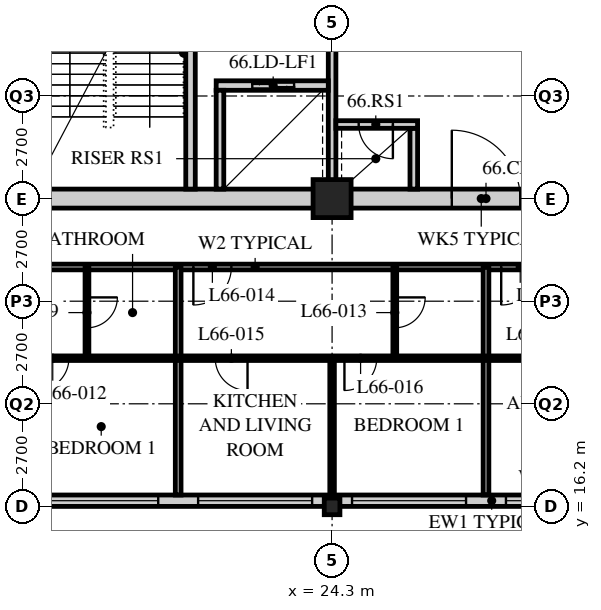
"""IFC4 building model, lengths in metres.
Left out: names, types, materials, properties, quantities, classifications, styles, units other than length and angle.
Written with IfcOpenShell. Run it as: python <this file> out.ifc"""

import sys

from ifc_helpers import new_model, si_unit, direction, frame, frame_2d, origin, origin_2d, place, context, subcontext, project, spatial, rectangle, hollow_rectangle, i_section, extrude, element, fill, save


model = new_model("IFC4")
c1 = context("Model", 3, precision=1e-05, world=origin(), true_north=direction((0.0, 1.0)))
c2 = subcontext(c1, "Body", "Model", "MODEL_VIEW")
j1 = project(units=[si_unit("LENGTHUNIT", "METRE"), si_unit("PLANEANGLEUNIT", "RADIAN")], contexts=[c1])
p1 = place(None, origin())
s1 = spatial("IfcSite", under=j1, at=p1, CompositionType="ELEMENT")
p2 = place(p1, origin())
s2 = spatial("IfcBuilding", under=s1, at=p2, CompositionType="ELEMENT")
p3 = place(p2, frame((0.0, 0.0, 258.0)))
s3 = spatial("IfcBuildingStorey", under=s2, at=p3, CompositionType="ELEMENT", Elevation=258.0)
p4 = place(p3, frame((24.3, 16.2, 0.0), z_axis=(0.0, 0.0, 1.0), x_axis=(1.0, 0.0, 0.0)))
e1 = element("IfcColumn", 1, at=p4, inside=s3, PredefinedType="COLUMN", context=c2, shape_type="SweptSolid", body=[
    extrude(i_section(OverallWidth=0.412, OverallDepth=0.437, WebThickness=0.036, FlangeThickness=0.058, FilletRadius=0.015, at=origin_2d()), origin(), (0.0, 0.0, 1.0), 3.9),
])
p5 = place(p3, frame((24.3, 24.3, 0.0), z_axis=(0.0, 0.0, 1.0), x_axis=(1.0, 0.0, 0.0)))
e2 = element("IfcColumn", 2, at=p5, inside=s3, PredefinedType="COLUMN", context=c2, shape_type="SweptSolid", body=[
    extrude(hollow_rectangle(XDim=1.0, YDim=1.0, WallThickness=0.1, at=origin_2d()), origin(), (0.0, 0.0, 1.0), 3.9),
])
p6 = place(p3, frame((8.4, 16.35, 0.0), z_axis=(0.0, 0.0, 1.0), x_axis=(1.0, 0.0, 0.0)))
e3 = element("IfcWall", 3, at=p6, inside=s3, PredefinedType="SOLIDWALL", context=c2, shape_type="SweptSolid", body=[
    extrude(rectangle(XDim=40.2, YDim=0.3, at=frame_2d((20.1, 0.0))), origin(), (0.0, 0.0, 1.0), 3.69),
])
p7 = place(p6, frame((0.225, 0.0, 0.6)))
e4 = element("IfcOpeningElement", 4, at=p7, cuts=e3, PredefinedType="OPENING", context=c2, shape_type="SweptSolid", body=[
    extrude(rectangle(XDim=3.0, YDim=2.4, at=frame_2d((1.5, 1.2))), frame((0.0, 0.16, 0.0), z_axis=(0.0, -1.0, 0.0), x_axis=(1.0, 0.0, 0.0)), (0.0, 0.0, 1.0), 0.32),
])
p8 = place(p6, frame((4.275, 0.0, 0.6)))
e5 = element("IfcOpeningElement", 5, at=p8, cuts=e3, PredefinedType="OPENING", context=c2, shape_type="SweptSolid", body=[
    extrude(rectangle(XDim=3.0, YDim=2.4, at=frame_2d((1.5, 1.2))), frame((0.0, 0.16, 0.0), z_axis=(0.0, -1.0, 0.0), x_axis=(1.0, 0.0, 0.0)), (0.0, 0.0, 1.0), 0.32),
])
p9 = place(p6, frame((8.325, 0.0, 0.6)))
e6 = element("IfcOpeningElement", 6, at=p9, cuts=e3, PredefinedType="OPENING", context=c2, shape_type="SweptSolid", body=[
    extrude(rectangle(XDim=3.0, YDim=2.4, at=frame_2d((1.5, 1.2))), frame((0.0, 0.16, 0.0), z_axis=(0.0, -1.0, 0.0), x_axis=(1.0, 0.0, 0.0)), (0.0, 0.0, 1.0), 0.32),
])
p10 = place(p6, frame((12.375, 0.0, 0.6)))
e7 = element("IfcOpeningElement", 7, at=p10, cuts=e3, PredefinedType="OPENING", context=c2, shape_type="SweptSolid", body=[
    extrude(rectangle(XDim=3.0, YDim=2.4, at=frame_2d((1.5, 1.2))), frame((0.0, 0.16, 0.0), z_axis=(0.0, -1.0, 0.0), x_axis=(1.0, 0.0, 0.0)), (0.0, 0.0, 1.0), 0.32),
])
p11 = place(p6, frame((16.425, 0.0, 0.6)))
e8 = element("IfcOpeningElement", 8, at=p11, cuts=e3, PredefinedType="OPENING", context=c2, shape_type="SweptSolid", body=[
    extrude(rectangle(XDim=3.0, YDim=2.4, at=frame_2d((1.5, 1.2))), frame((0.0, 0.16, 0.0), z_axis=(0.0, -1.0, 0.0), x_axis=(1.0, 0.0, 0.0)), (0.0, 0.0, 1.0), 0.32),
])
p12 = place(p6, frame((20.475, 0.0, 0.6)))
e9 = element("IfcOpeningElement", 9, at=p12, cuts=e3, PredefinedType="OPENING", context=c2, shape_type="SweptSolid", body=[
    extrude(rectangle(XDim=3.0, YDim=2.4, at=frame_2d((1.5, 1.2))), frame((0.0, 0.16, 0.0), z_axis=(0.0, -1.0, 0.0), x_axis=(1.0, 0.0, 0.0)), (0.0, 0.0, 1.0), 0.32),
])
p13 = place(p6, frame((24.525, 0.0, 0.6)))
e10 = element("IfcOpeningElement", 10, at=p13, cuts=e3, PredefinedType="OPENING", context=c2, shape_type="SweptSolid", body=[
    extrude(rectangle(XDim=3.0, YDim=2.4, at=frame_2d((1.5, 1.2))), frame((0.0, 0.16, 0.0), z_axis=(0.0, -1.0, 0.0), x_axis=(1.0, 0.0, 0.0)), (0.0, 0.0, 1.0), 0.32),
])
p14 = place(p6, frame((28.575, 0.0, 0.6)))
e11 = element("IfcOpeningElement", 11, at=p14, cuts=e3, PredefinedType="OPENING", context=c2, shape_type="SweptSolid", body=[
    extrude(rectangle(XDim=3.0, YDim=2.4, at=frame_2d((1.5, 1.2))), frame((0.0, 0.16, 0.0), z_axis=(0.0, -1.0, 0.0), x_axis=(1.0, 0.0, 0.0)), (0.0, 0.0, 1.0), 0.32),
])
p15 = place(p6, frame((32.625, 0.0, 0.6)))
e12 = element("IfcOpeningElement", 12, at=p15, cuts=e3, PredefinedType="OPENING", context=c2, shape_type="SweptSolid", body=[
    extrude(rectangle(XDim=3.0, YDim=2.4, at=frame_2d((1.5, 1.2))), frame((0.0, 0.16, 0.0), z_axis=(0.0, -1.0, 0.0), x_axis=(1.0, 0.0, 0.0)), (0.0, 0.0, 1.0), 0.32),
])
p16 = place(p6, frame((36.675, 0.0, 0.6)))
e13 = element("IfcOpeningElement", 13, at=p16, cuts=e3, PredefinedType="OPENING", context=c2, shape_type="SweptSolid", body=[
    extrude(rectangle(XDim=3.0, YDim=2.4, at=frame_2d((1.5, 1.2))), frame((0.0, 0.16, 0.0), z_axis=(0.0, -1.0, 0.0), x_axis=(1.0, 0.0, 0.0)), (0.0, 0.0, 1.0), 0.32),
])
p17 = place(p3, frame((8.1, 22.5, 0.0), z_axis=(0.0, 0.0, 1.0), x_axis=(1.0, 0.0, 0.0)))
e14 = element("IfcWall", 14, at=p17, inside=s3, PredefinedType="PARTITIONING", context=c2, shape_type="SweptSolid", body=[
    extrude(rectangle(XDim=28.35, YDim=0.15, at=frame_2d((14.175, 0.0))), origin(), (0.0, 0.0, 1.0), 3.69),
])
p18 = place(p17, frame((4.45, 0.0, 0.0)))
e15 = element("IfcOpeningElement", 15, at=p18, cuts=e14, PredefinedType="OPENING", context=c2, shape_type="SweptSolid", body=[
    extrude(rectangle(XDim=1.0, YDim=2.1, at=frame_2d((0.5, 1.05))), frame((0.0, 0.085, 0.0), z_axis=(0.0, -1.0, 0.0), x_axis=(1.0, 0.0, 0.0)), (0.0, 0.0, 1.0), 0.17),
])
p19 = place(p17, frame((12.55, 0.0, 0.0)))
e16 = element("IfcOpeningElement", 16, at=p19, cuts=e14, PredefinedType="OPENING", context=c2, shape_type="SweptSolid", body=[
    extrude(rectangle(XDim=1.0, YDim=2.1, at=frame_2d((0.5, 1.05))), frame((0.0, 0.085, 0.0), z_axis=(0.0, -1.0, 0.0), x_axis=(1.0, 0.0, 0.0)), (0.0, 0.0, 1.0), 0.17),
])
p20 = place(p17, frame((20.65, 0.0, 0.0)))
e17 = element("IfcOpeningElement", 17, at=p20, cuts=e14, PredefinedType="OPENING", context=c2, shape_type="SweptSolid", body=[
    extrude(rectangle(XDim=1.0, YDim=2.1, at=frame_2d((0.5, 1.05))), frame((0.0, 0.085, 0.0), z_axis=(0.0, -1.0, 0.0), x_axis=(1.0, 0.0, 0.0)), (0.0, 0.0, 1.0), 0.17),
])
p21 = place(p17, frame((2.625, 0.0, 0.0)))
e18 = element("IfcOpeningElement", 18, at=p21, cuts=e14, PredefinedType="OPENING", context=c2, shape_type="SweptSolid", body=[
    extrude(rectangle(XDim=1.0, YDim=2.1, at=frame_2d((0.5, 1.05))), frame((0.0, 0.085, 0.0), z_axis=(0.0, -1.0, 0.0), x_axis=(1.0, 0.0, 0.0)), (0.0, 0.0, 1.0), 0.17),
])
p22 = place(p3, frame((17.85, 22.5, 0.0), z_axis=(0.0, 0.0, 1.0), x_axis=(0.0, -1.0, 0.0)))
e19 = element("IfcWall", 19, at=p22, inside=s3, PredefinedType="PARTITIONING", context=c2, shape_type="SweptSolid", body=[
    extrude(rectangle(XDim=2.4, YDim=0.1, at=frame_2d((1.2, 0.0))), origin(), (0.0, 0.0, 1.0), 3.69),
])
p23 = place(p22, frame((0.8, 0.0, 0.0)))
e20 = element("IfcOpeningElement", 20, at=p23, cuts=e19, PredefinedType="OPENING", context=c2, shape_type="SweptSolid", body=[
    extrude(rectangle(XDim=0.8, YDim=2.1, at=frame_2d((0.4, 1.05))), frame((0.0, 0.06, 0.0), z_axis=(0.0, -1.0, 0.0), x_axis=(1.0, 0.0, 0.0)), (0.0, 0.0, 1.0), 0.12),
])
p24 = place(p3, frame((20.25, 22.5, 0.0), z_axis=(0.0, 0.0, 1.0), x_axis=(0.0, -1.0, 0.0)))
e21 = element("IfcWall", 21, at=p24, inside=s3, PredefinedType="PARTITIONING", context=c2, shape_type="SweptSolid", body=[
    extrude(rectangle(XDim=6.0, YDim=0.15, at=frame_2d((3.0, 0.0))), origin(), (0.0, 0.0, 1.0), 3.69),
])
p25 = place(p3, frame((25.95, 22.5, 0.0), z_axis=(0.0, 0.0, 1.0), x_axis=(0.0, -1.0, 0.0)))
e22 = element("IfcWall", 22, at=p25, inside=s3, PredefinedType="PARTITIONING", context=c2, shape_type="SweptSolid", body=[
    extrude(rectangle(XDim=2.4, YDim=0.1, at=frame_2d((1.2, 0.0))), origin(), (0.0, 0.0, 1.0), 3.69),
])
p26 = place(p25, frame((0.8, 0.0, 0.0)))
e23 = element("IfcOpeningElement", 23, at=p26, cuts=e22, PredefinedType="OPENING", context=c2, shape_type="SweptSolid", body=[
    extrude(rectangle(XDim=0.8, YDim=2.1, at=frame_2d((0.4, 1.05))), frame((0.0, 0.06, 0.0), z_axis=(0.0, -1.0, 0.0), x_axis=(1.0, 0.0, 0.0)), (0.0, 0.0, 1.0), 0.12),
])
p27 = place(p3, frame((24.3, 20.1, 0.0), z_axis=(0.0, 0.0, 1.0), x_axis=(0.0, -1.0, 0.0)))
e24 = element("IfcWall", 24, at=p27, inside=s3, PredefinedType="PARTITIONING", context=c2, shape_type="SweptSolid", body=[
    extrude(rectangle(XDim=3.6, YDim=0.12, at=frame_2d((1.8, 0.0))), origin(), (0.0, 0.0, 1.0), 3.078),
])
p28 = place(p3, frame((28.35, 22.5, 0.0), z_axis=(0.0, 0.0, 1.0), x_axis=(0.0, -1.0, 0.0)))
e25 = element("IfcWall", 25, at=p28, inside=s3, PredefinedType="PARTITIONING", context=c2, shape_type="SweptSolid", body=[
    extrude(rectangle(XDim=6.0, YDim=0.15, at=frame_2d((3.0, 0.0))), origin(), (0.0, 0.0, 1.0), 3.69),
])
p29 = place(p3, frame((8.1, 20.1, 0.0), z_axis=(0.0, 0.0, 1.0), x_axis=(1.0, 0.0, 0.0)))
e26 = element("IfcWall", 26, at=p29, inside=s3, PredefinedType="PARTITIONING", context=c2, shape_type="SweptSolid", body=[
    extrude(rectangle(XDim=28.35, YDim=0.12, at=frame_2d((14.175, 0.0))), origin(), (0.0, 0.0, 1.0), 3.69),
])
p30 = place(p29, frame((5.025, 0.0, 0.0)))
e27 = element("IfcOpeningElement", 27, at=p30, cuts=e26, PredefinedType="OPENING", context=c2, shape_type="SweptSolid", body=[
    extrude(rectangle(XDim=0.85, YDim=2.1, at=frame_2d((0.425, 1.05))), frame((0.0, 0.07, 0.0), z_axis=(0.0, -1.0, 0.0), x_axis=(1.0, 0.0, 0.0)), (0.0, 0.0, 1.0), 0.14),
])
p31 = place(p29, frame((8.425, 0.0, 0.0)))
e28 = element("IfcOpeningElement", 28, at=p31, cuts=e26, PredefinedType="OPENING", context=c2, shape_type="SweptSolid", body=[
    extrude(rectangle(XDim=0.85, YDim=2.1, at=frame_2d((0.425, 1.05))), frame((0.0, 0.07, 0.0), z_axis=(0.0, -1.0, 0.0), x_axis=(1.0, 0.0, 0.0)), (0.0, 0.0, 1.0), 0.14),
])
p32 = place(p29, frame((13.125, 0.0, 0.0)))
e29 = element("IfcOpeningElement", 29, at=p32, cuts=e26, PredefinedType="OPENING", context=c2, shape_type="SweptSolid", body=[
    extrude(rectangle(XDim=0.85, YDim=2.1, at=frame_2d((0.425, 1.05))), frame((0.0, 0.07, 0.0), z_axis=(0.0, -1.0, 0.0), x_axis=(1.0, 0.0, 0.0)), (0.0, 0.0, 1.0), 0.14),
])
p33 = place(p29, frame((16.525, 0.0, 0.0)))
e30 = element("IfcOpeningElement", 30, at=p33, cuts=e26, PredefinedType="OPENING", context=c2, shape_type="SweptSolid", body=[
    extrude(rectangle(XDim=0.85, YDim=2.1, at=frame_2d((0.425, 1.05))), frame((0.0, 0.07, 0.0), z_axis=(0.0, -1.0, 0.0), x_axis=(1.0, 0.0, 0.0)), (0.0, 0.0, 1.0), 0.14),
])
p34 = place(p29, frame((21.225, 0.0, 0.0)))
e31 = element("IfcOpeningElement", 31, at=p34, cuts=e26, PredefinedType="OPENING", context=c2, shape_type="SweptSolid", body=[
    extrude(rectangle(XDim=0.85, YDim=2.1, at=frame_2d((0.425, 1.05))), frame((0.0, 0.07, 0.0), z_axis=(0.0, -1.0, 0.0), x_axis=(1.0, 0.0, 0.0)), (0.0, 0.0, 1.0), 0.14),
])
p35 = place(p29, frame((24.625, 0.0, 0.0)))
e32 = element("IfcOpeningElement", 32, at=p35, cuts=e26, PredefinedType="OPENING", context=c2, shape_type="SweptSolid", body=[
    extrude(rectangle(XDim=0.85, YDim=2.1, at=frame_2d((0.425, 1.05))), frame((0.0, 0.07, 0.0), z_axis=(0.0, -1.0, 0.0), x_axis=(1.0, 0.0, 0.0)), (0.0, 0.0, 1.0), 0.14),
])
p36 = place(p29, frame((2.725, 0.0, 0.0)))
e33 = element("IfcOpeningElement", 33, at=p36, cuts=e26, PredefinedType="OPENING", context=c2, shape_type="SweptSolid", body=[
    extrude(rectangle(XDim=0.85, YDim=2.1, at=frame_2d((0.425, 1.05))), frame((0.0, 0.07, 0.0), z_axis=(0.0, -1.0, 0.0), x_axis=(1.0, 0.0, 0.0)), (0.0, 0.0, 1.0), 0.14),
])
p37 = place(p3, frame((15.95, 24.3, 0.0), z_axis=(0.0, 0.0, 1.0), x_axis=(1.0, 0.0, 0.0)))
e34 = element("IfcWall", 34, at=p37, inside=s3, PredefinedType="SOLIDWALL", context=c2, shape_type="SweptSolid", body=[
    extrude(rectangle(XDim=24.55, YDim=0.5, at=frame_2d((12.275, 0.0))), origin(), (0.0, 0.0, 1.0), 3.04),
])
p38 = place(p37, frame((11.5, 0.0, 0.0)))
e35 = element("IfcOpeningElement", 35, at=p38, cuts=e34, PredefinedType="OPENING", context=c2, shape_type="SweptSolid", body=[
    extrude(rectangle(XDim=1.8, YDim=2.4, at=frame_2d((0.9, 1.2))), frame((0.0, 0.26, 0.0), z_axis=(0.0, -1.0, 0.0), x_axis=(1.0, 0.0, 0.0)), (0.0, 0.0, 1.0), 0.52),
])
p39 = place(p3, frame((24.3, 24.55, 0.0), z_axis=(0.0, 0.0, 1.0), x_axis=(0.0, 1.0, 0.0)))
e36 = element("IfcWall", 36, at=p39, inside=s3, PredefinedType="SOLIDWALL", context=c2, shape_type="SweptSolid", body=[
    extrude(rectangle(XDim=7.75, YDim=0.2, at=frame_2d((3.875, 0.0))), origin(), (0.0, 0.0, 1.0), 3.078),
])
p40 = place(p39, frame((4.6, 0.0, 0.0)))
e37 = element("IfcOpeningElement", 37, at=p40, cuts=e36, PredefinedType="OPENING", context=c2, shape_type="SweptSolid", body=[
    extrude(rectangle(XDim=1.2, YDim=2.1, at=frame_2d((0.6, 1.05))), frame((0.0, 0.11, 0.0), z_axis=(0.0, -1.0, 0.0), x_axis=(1.0, 0.0, 0.0)), (0.0, 0.0, 1.0), 0.22),
])
p41 = place(p3, frame((20.575, 24.55, 0.0), z_axis=(0.0, 0.0, 1.0), x_axis=(0.0, 1.0, 0.0)))
e38 = element("IfcWall", 38, at=p41, inside=s3, PredefinedType="SOLIDWALL", context=c2, shape_type="SweptSolid", body=[
    extrude(rectangle(XDim=7.75, YDim=0.25, at=frame_2d((3.875, 0.0))), origin(), (0.0, 0.0, 1.0), 3.69),
])
p42 = place(p41, frame((6.2, 0.0, 0.0)))
e39 = element("IfcOpeningElement", 39, at=p42, cuts=e38, PredefinedType="OPENING", context=c2, shape_type="SweptSolid", body=[
    extrude(rectangle(XDim=1.2, YDim=2.1, at=frame_2d((0.6, 1.05))), frame((0.0, 0.135, 0.0), z_axis=(0.0, -1.0, 0.0), x_axis=(1.0, 0.0, 0.0)), (0.0, 0.0, 1.0), 0.27),
])
p43 = place(p3, frame((21.25, 27.275, 0.0), z_axis=(0.0, 0.0, 1.0), x_axis=(1.0, 0.0, 0.0)))
e40 = element("IfcWall", 40, at=p43, inside=s3, PredefinedType="SOLIDWALL", context=c2, shape_type="SweptSolid", body=[
    extrude(rectangle(XDim=2.95, YDim=0.25, at=frame_2d((1.475, 0.0))), origin(), (0.0, 0.0, 1.0), 3.69),
])
p44 = place(p43, frame((0.95, 0.0, 0.0)))
e41 = element("IfcOpeningElement", 41, at=p44, cuts=e40, PredefinedType="OPENING", context=c2, shape_type="SweptSolid", body=[
    extrude(rectangle(XDim=1.1, YDim=2.4, at=frame_2d((0.55, 1.2))), frame((0.0, 0.135, 0.0), z_axis=(0.0, -1.0, 0.0), x_axis=(1.0, 0.0, 0.0)), (0.0, 0.0, 1.0), 0.27),
])
p45 = place(p3, frame((21.35, 24.55, 0.0), z_axis=(0.0, 0.0, 1.0), x_axis=(0.0, 1.0, 0.0)))
e42 = element("IfcWall", 42, at=p45, inside=s3, PredefinedType="SOLIDWALL", context=c2, shape_type="SweptSolid", body=[
    extrude(rectangle(XDim=2.6, YDim=0.2, at=frame_2d((1.3, 0.0))), origin(), (0.0, 0.0, 1.0), 3.69),
])
p46 = place(p3, frame((26.45, 24.55, 0.0), z_axis=(0.0, 0.0, 1.0), x_axis=(0.0, 1.0, 0.0)))
e43 = element("IfcWall", 43, at=p46, inside=s3, PredefinedType="SOLIDWALL", context=c2, shape_type="SweptSolid", body=[
    extrude(rectangle(XDim=1.6, YDim=0.2, at=frame_2d((0.8, 0.0))), origin(), (0.0, 0.0, 1.0), 3.69),
])
p47 = place(p3, frame((24.4, 26.25, 0.0), z_axis=(0.0, 0.0, 1.0), x_axis=(1.0, 0.0, 0.0)))
e44 = element("IfcWall", 44, at=p47, inside=s3, PredefinedType="SOLIDWALL", context=c2, shape_type="SweptSolid", body=[
    extrude(rectangle(XDim=2.15, YDim=0.2, at=frame_2d((1.075, 0.0))), origin(), (0.0, 0.0, 1.0), 3.69),
])
p48 = place(p47, frame((0.6, 0.0, 0.0)))
e45 = element("IfcOpeningElement", 45, at=p48, cuts=e44, PredefinedType="OPENING", context=c2, shape_type="SweptSolid", body=[
    extrude(rectangle(XDim=0.9, YDim=2.1, at=frame_2d((0.45, 1.05))), frame((0.0, 0.11, 0.0), z_axis=(0.0, -1.0, 0.0), x_axis=(1.0, 0.0, 0.0)), (0.0, 0.0, 1.0), 0.22),
])
p49 = place(p9, origin())
e46 = element("IfcWindow", 46, at=p49, inside=s3, PartitioningType="SINGLE_PANEL", PredefinedType="WINDOW", context=c2, shape_type="SweptSolid", body=[
    extrude(rectangle(XDim=3.0, YDim=2.4, at=frame_2d((1.5, 1.2))), frame((0.0, 0.03, 0.0), z_axis=(0.0, -1.0, 0.0), x_axis=(1.0, 0.0, 0.0)), (0.0, 0.0, 1.0), 0.06),
])
fill(e6, e46)
p50 = place(p10, origin())
e47 = element("IfcWindow", 47, at=p50, inside=s3, PartitioningType="SINGLE_PANEL", PredefinedType="WINDOW", context=c2, shape_type="SweptSolid", body=[
    extrude(rectangle(XDim=3.0, YDim=2.4, at=frame_2d((1.5, 1.2))), frame((0.0, 0.03, 0.0), z_axis=(0.0, -1.0, 0.0), x_axis=(1.0, 0.0, 0.0)), (0.0, 0.0, 1.0), 0.06),
])
fill(e7, e47)
p51 = place(p11, origin())
e48 = element("IfcWindow", 48, at=p51, inside=s3, PartitioningType="SINGLE_PANEL", PredefinedType="WINDOW", context=c2, shape_type="SweptSolid", body=[
    extrude(rectangle(XDim=3.0, YDim=2.4, at=frame_2d((1.5, 1.2))), frame((0.0, 0.03, 0.0), z_axis=(0.0, -1.0, 0.0), x_axis=(1.0, 0.0, 0.0)), (0.0, 0.0, 1.0), 0.06),
])
fill(e8, e48)
p52 = place(p12, origin())
e49 = element("IfcWindow", 49, at=p52, inside=s3, PartitioningType="SINGLE_PANEL", PredefinedType="WINDOW", context=c2, shape_type="SweptSolid", body=[
    extrude(rectangle(XDim=3.0, YDim=2.4, at=frame_2d((1.5, 1.2))), frame((0.0, 0.03, 0.0), z_axis=(0.0, -1.0, 0.0), x_axis=(1.0, 0.0, 0.0)), (0.0, 0.0, 1.0), 0.06),
])
fill(e9, e49)
p53 = place(p23, origin())
e50 = element("IfcDoor", 50, at=p53, inside=s3, OperationType="SINGLE_SWING_LEFT", PredefinedType="DOOR", context=c2, shape_type="SweptSolid", body=[
    extrude(rectangle(XDim=0.8, YDim=2.1, at=frame_2d((0.4, 1.05))), frame((0.0, 0.025, 0.0), z_axis=(0.0, -1.0, 0.0), x_axis=(1.0, 0.0, 0.0)), (0.0, 0.0, 1.0), 0.05),
])
fill(e20, e50)
p54 = place(p31, origin())
e51 = element("IfcDoor", 51, at=p54, inside=s3, OperationType="SINGLE_SWING_RIGHT", PredefinedType="DOOR", context=c2, shape_type="SweptSolid", body=[
    extrude(rectangle(XDim=0.85, YDim=2.1, at=frame_2d((0.425, 1.05))), frame((0.0, 0.025, 0.0), z_axis=(0.0, -1.0, 0.0), x_axis=(1.0, 0.0, 0.0)), (0.0, 0.0, 1.0), 0.05),
])
fill(e28, e51)
p55 = place(p26, origin())
e52 = element("IfcDoor", 52, at=p55, inside=s3, OperationType="SINGLE_SWING_LEFT", PredefinedType="DOOR", context=c2, shape_type="SweptSolid", body=[
    extrude(rectangle(XDim=0.8, YDim=2.1, at=frame_2d((0.4, 1.05))), frame((0.0, 0.025, 0.0), z_axis=(0.0, -1.0, 0.0), x_axis=(1.0, 0.0, 0.0)), (0.0, 0.0, 1.0), 0.05),
])
fill(e23, e52)
p56 = place(p19, origin())
e53 = element("IfcDoor", 53, at=p56, inside=s3, OperationType="SINGLE_SWING_RIGHT", PredefinedType="DOOR", context=c2, shape_type="SweptSolid", body=[
    extrude(rectangle(XDim=1.0, YDim=2.1, at=frame_2d((0.5, 1.05))), frame((0.0, 0.025, 0.0), z_axis=(0.0, -1.0, 0.0), x_axis=(1.0, 0.0, 0.0)), (0.0, 0.0, 1.0), 0.05),
])
fill(e16, e53)
p57 = place(p32, origin())
e54 = element("IfcDoor", 54, at=p57, inside=s3, OperationType="SINGLE_SWING_LEFT", PredefinedType="DOOR", context=c2, shape_type="SweptSolid", body=[
    extrude(rectangle(XDim=0.85, YDim=2.1, at=frame_2d((0.425, 1.05))), frame((0.0, 0.025, 0.0), z_axis=(0.0, -1.0, 0.0), x_axis=(1.0, 0.0, 0.0)), (0.0, 0.0, 1.0), 0.05),
])
fill(e29, e54)
p58 = place(p33, origin())
e55 = element("IfcDoor", 55, at=p58, inside=s3, OperationType="SINGLE_SWING_RIGHT", PredefinedType="DOOR", context=c2, shape_type="SweptSolid", body=[
    extrude(rectangle(XDim=0.85, YDim=2.1, at=frame_2d((0.425, 1.05))), frame((0.0, 0.025, 0.0), z_axis=(0.0, -1.0, 0.0), x_axis=(1.0, 0.0, 0.0)), (0.0, 0.0, 1.0), 0.05),
])
fill(e30, e55)
p59 = place(p20, origin())
e56 = element("IfcDoor", 56, at=p59, inside=s3, OperationType="SINGLE_SWING_RIGHT", PredefinedType="DOOR", context=c2, shape_type="SweptSolid", body=[
    extrude(rectangle(XDim=1.0, YDim=2.1, at=frame_2d((0.5, 1.05))), frame((0.0, 0.025, 0.0), z_axis=(0.0, -1.0, 0.0), x_axis=(1.0, 0.0, 0.0)), (0.0, 0.0, 1.0), 0.05),
])
fill(e17, e56)
p60 = place(p48, origin())
e57 = element("IfcDoor", 57, at=p60, inside=s3, OperationType="SINGLE_SWING_LEFT", PredefinedType="DOOR", context=c2, shape_type="SweptSolid", body=[
    extrude(rectangle(XDim=0.9, YDim=2.1, at=frame_2d((0.45, 1.05))), frame((0.0, 0.025, 0.0), z_axis=(0.0, -1.0, 0.0), x_axis=(1.0, 0.0, 0.0)), (0.0, 0.0, 1.0), 0.05),
])
fill(e45, e57)
p61 = place(p44, origin())
e58 = element("IfcDoor", 58, at=p61, inside=s3, OperationType="DOUBLE_DOOR_SLIDING", PredefinedType="DOOR", context=c2, shape_type="SweptSolid", body=[
    extrude(rectangle(XDim=1.1, YDim=2.4, at=frame_2d((0.55, 1.2))), frame((0.0, 0.025, 0.0), z_axis=(0.0, -1.0, 0.0), x_axis=(1.0, 0.0, 0.0)), (0.0, 0.0, 1.0), 0.05),
])
fill(e41, e58)
p62 = place(p38, origin())
e59 = element("IfcDoor", 59, at=p62, inside=s3, OperationType="DOUBLE_DOOR_SINGLE_SWING", PredefinedType="DOOR", context=c2, shape_type="SweptSolid", body=[
    extrude(rectangle(XDim=1.8, YDim=2.4, at=frame_2d((0.9, 1.2))), frame((0.0, 0.025, 0.0), z_axis=(0.0, -1.0, 0.0), x_axis=(1.0, 0.0, 0.0)), (0.0, 0.0, 1.0), 0.05),
])
fill(e35, e59)
save(model, sys.argv[1])
